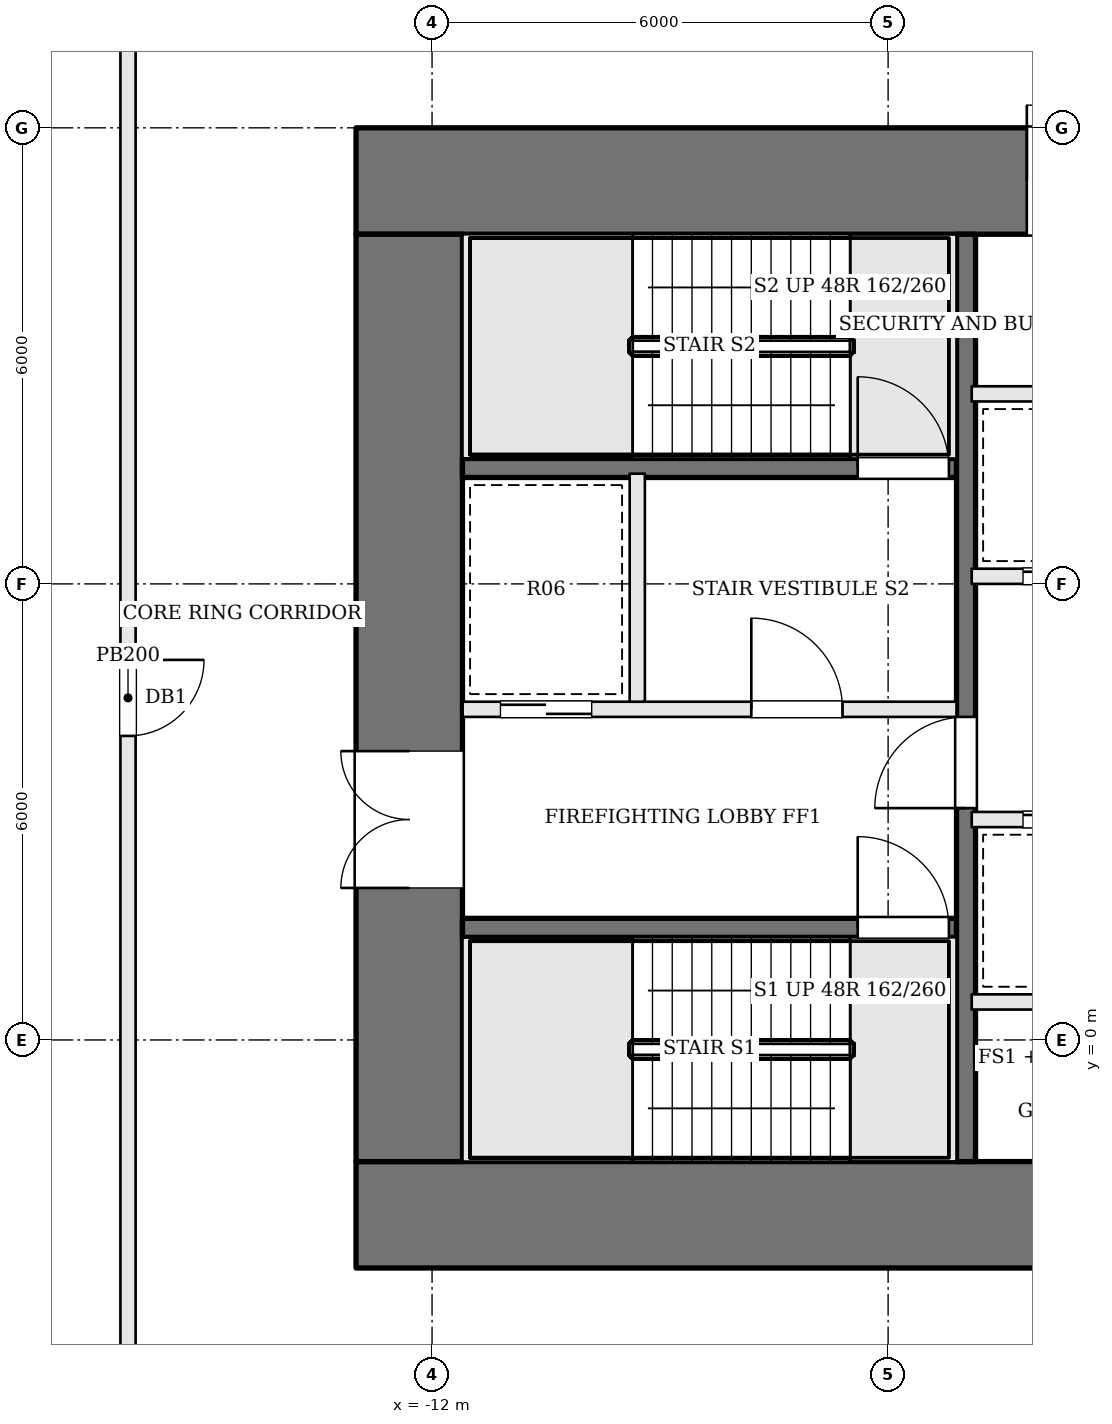
"""IFC4 building model, lengths in metres.
Left out: names, types, materials, properties, quantities, classifications, styles, units other than length and angle.
Written with IfcOpenShell. Run it as: python <this file> out.ifc"""

import sys

from ifc_helpers import new_model, si_unit, direction, frame, frame_2d, origin, place, context, subcontext, project, spatial, rectangle, extrude, element, fill, save


model = new_model("IFC4")
c1 = context("Model", 3, precision=1e-05, world=origin(), true_north=direction((0.0, 1.0)))
c2 = subcontext(c1, "Body", "Model", "MODEL_VIEW")
j1 = project(units=[si_unit("LENGTHUNIT", "METRE"), si_unit("PLANEANGLEUNIT", "RADIAN")], contexts=[c1])
p1 = place(None, origin())
s1 = spatial("IfcSite", under=j1, at=p1, CompositionType="ELEMENT")
p2 = place(p1, origin())
s2 = spatial("IfcBuilding", under=s1, at=p2, CompositionType="ELEMENT")
p3 = place(p2, frame((0.0, 0.0, 15.0)))
s3 = spatial("IfcBuildingStorey", under=s2, at=p3, CompositionType="ELEMENT", Elevation=15.0)
p4 = place(p3, frame((-13.0, 11.3, 0.0), z_axis=(0.0, 0.0, 1.0), x_axis=(1.0, 0.0, 0.0)))
e1 = element("IfcWall", 1, at=p4, inside=s3, PredefinedType="SHEAR", context=c2, shape_type="SweptSolid", body=[
    extrude(rectangle(XDim=26.0, YDim=1.4, at=frame_2d((13.0, 0.0))), origin(), (0.0, 0.0, 1.0), 7.8),
])
p5 = place(p4, frame((8.825, 0.0, 0.0)))
e2 = element("IfcOpeningElement", 2, at=p5, cuts=e1, PredefinedType="OPENING", context=c2, shape_type="SweptSolid", body=[
    extrude(rectangle(XDim=1.0, YDim=2.1, at=frame_2d((0.5, 1.05))), frame((0.0, 0.71, 0.0), z_axis=(0.0, -1.0, 0.0), x_axis=(1.0, 0.0, 0.0)), (0.0, 0.0, 1.0), 1.42),
])
p6 = place(p4, frame((11.425, 0.0, 0.0)))
e3 = element("IfcOpeningElement", 3, at=p6, cuts=e1, PredefinedType="OPENING", context=c2, shape_type="SweptSolid", body=[
    extrude(rectangle(XDim=0.7, YDim=2.1, at=frame_2d((0.35, 1.05))), frame((0.0, 0.71, 0.0), z_axis=(0.0, -1.0, 0.0), x_axis=(1.0, 0.0, 0.0)), (0.0, 0.0, 1.0), 1.42),
])
p7 = place(p4, frame((14.275, 0.0, 0.0)))
e4 = element("IfcOpeningElement", 4, at=p7, cuts=e1, PredefinedType="OPENING", context=c2, shape_type="SweptSolid", body=[
    extrude(rectangle(XDim=0.7, YDim=2.1, at=frame_2d((0.35, 1.05))), frame((0.0, 0.71, 0.0), z_axis=(0.0, -1.0, 0.0), x_axis=(1.0, 0.0, 0.0)), (0.0, 0.0, 1.0), 1.42),
])
p8 = place(p4, frame((16.725, 0.0, 0.0)))
e5 = element("IfcOpeningElement", 5, at=p8, cuts=e1, PredefinedType="OPENING", context=c2, shape_type="SweptSolid", body=[
    extrude(rectangle(XDim=0.7, YDim=2.1, at=frame_2d((0.35, 1.05))), frame((0.0, 0.71, 0.0), z_axis=(0.0, -1.0, 0.0), x_axis=(1.0, 0.0, 0.0)), (0.0, 0.0, 1.0), 1.42),
])
p9 = place(p3, frame((-13.0, -2.3, 0.0), z_axis=(0.0, 0.0, 1.0), x_axis=(1.0, 0.0, 0.0)))
e6 = element("IfcWall", 6, at=p9, inside=s3, PredefinedType="SHEAR", context=c2, shape_type="SweptSolid", body=[
    extrude(rectangle(XDim=26.0, YDim=1.4, at=frame_2d((13.0, 0.0))), origin(), (0.0, 0.0, 1.0), 7.8),
])
p10 = place(p9, frame((9.0, 0.0, 0.0)))
e7 = element("IfcOpeningElement", 7, at=p10, cuts=e6, PredefinedType="OPENING", context=c2, shape_type="SweptSolid", body=[
    extrude(rectangle(XDim=0.9, YDim=2.1, at=frame_2d((0.45, 1.05))), frame((0.0, 0.71, 0.0), z_axis=(0.0, -1.0, 0.0), x_axis=(1.0, 0.0, 0.0)), (0.0, 0.0, 1.0), 1.42),
])
p11 = place(p9, frame((12.225, 0.0, 0.0)))
e8 = element("IfcOpeningElement", 8, at=p11, cuts=e6, PredefinedType="OPENING", context=c2, shape_type="SweptSolid", body=[
    extrude(rectangle(XDim=0.9, YDim=2.1, at=frame_2d((0.45, 1.05))), frame((0.0, 0.71, 0.0), z_axis=(0.0, -1.0, 0.0), x_axis=(1.0, 0.0, 0.0)), (0.0, 0.0, 1.0), 1.42),
])
p12 = place(p9, frame((14.85, 0.0, 0.0)))
e9 = element("IfcOpeningElement", 9, at=p12, cuts=e6, PredefinedType="OPENING", context=c2, shape_type="SweptSolid", body=[
    extrude(rectangle(XDim=0.9, YDim=2.1, at=frame_2d((0.45, 1.05))), frame((0.0, 0.71, 0.0), z_axis=(0.0, -1.0, 0.0), x_axis=(1.0, 0.0, 0.0)), (0.0, 0.0, 1.0), 1.42),
])
p13 = place(p9, frame((16.475, 0.0, 0.0)))
e10 = element("IfcOpeningElement", 10, at=p13, cuts=e6, PredefinedType="OPENING", context=c2, shape_type="SweptSolid", body=[
    extrude(rectangle(XDim=1.0, YDim=2.1, at=frame_2d((0.5, 1.05))), frame((0.0, 0.71, 0.0), z_axis=(0.0, -1.0, 0.0), x_axis=(1.0, 0.0, 0.0)), (0.0, 0.0, 1.0), 1.42),
])
p14 = place(p3, frame((-12.3, -1.6, 0.0), z_axis=(0.0, 0.0, 1.0), x_axis=(0.0, 1.0, 0.0)))
e11 = element("IfcWall", 11, at=p14, inside=s3, PredefinedType="SHEAR", context=c2, shape_type="SweptSolid", body=[
    extrude(rectangle(XDim=12.2, YDim=1.4, at=frame_2d((6.1, 0.0))), origin(), (0.0, 0.0, 1.0), 7.8),
])
p15 = place(p14, frame((3.6, 0.0, 0.0)))
e12 = element("IfcOpeningElement", 12, at=p15, cuts=e11, PredefinedType="OPENING", context=c2, shape_type="SweptSolid", body=[
    extrude(rectangle(XDim=1.8, YDim=2.1, at=frame_2d((0.9, 1.05))), frame((0.0, 0.71, 0.0), z_axis=(0.0, -1.0, 0.0), x_axis=(1.0, 0.0, 0.0)), (0.0, 0.0, 1.0), 1.42),
])
p16 = place(p3, frame((-11.6, 1.475, 0.0), z_axis=(0.0, 0.0, 1.0), x_axis=(1.0, 0.0, 0.0)))
e13 = element("IfcWall", 13, at=p16, inside=s3, PredefinedType="SOLIDWALL", context=c2, shape_type="SweptSolid", body=[
    extrude(rectangle(XDim=6.5, YDim=0.25, at=frame_2d((3.25, 0.0))), origin(), (0.0, 0.0, 1.0), 7.55),
])
p17 = place(p16, frame((5.2, 0.0, 0.0)))
e14 = element("IfcOpeningElement", 14, at=p17, cuts=e13, PredefinedType="OPENING", context=c2, shape_type="SweptSolid", body=[
    extrude(rectangle(XDim=1.2, YDim=2.1, at=frame_2d((0.6, 1.05))), frame((0.0, 0.135, 0.0), z_axis=(0.0, -1.0, 0.0), x_axis=(1.0, 0.0, 0.0)), (0.0, 0.0, 1.0), 0.27),
])
p18 = place(p3, frame((-11.6, 4.35, 0.0), z_axis=(0.0, 0.0, 1.0), x_axis=(1.0, 0.0, 0.0)))
e15 = element("IfcWall", 15, at=p18, inside=s3, PredefinedType="SOLIDWALL", context=c2, shape_type="SweptSolid", body=[
    extrude(rectangle(XDim=6.5, YDim=0.2, at=frame_2d((3.25, 0.0))), origin(), (0.0, 0.0, 1.0), 7.55),
])
p19 = place(p18, frame((3.8, 0.0, 0.0)))
e16 = element("IfcOpeningElement", 16, at=p19, cuts=e15, PredefinedType="OPENING", context=c2, shape_type="SweptSolid", body=[
    extrude(rectangle(XDim=1.2, YDim=2.1, at=frame_2d((0.6, 1.05))), frame((0.0, 0.11, 0.0), z_axis=(0.0, -1.0, 0.0), x_axis=(1.0, 0.0, 0.0)), (0.0, 0.0, 1.0), 0.22),
])
p20 = place(p18, frame((0.5, 0.0, 0.0)))
e17 = element("IfcOpeningElement", 17, at=p20, cuts=e15, PredefinedType="OPENING", context=c2, shape_type="SweptSolid", body=[
    extrude(rectangle(XDim=1.2, YDim=2.1, at=frame_2d((0.6, 1.05))), frame((0.0, 0.11, 0.0), z_axis=(0.0, -1.0, 0.0), x_axis=(1.0, 0.0, 0.0)), (0.0, 0.0, 1.0), 0.22),
])
p21 = place(p3, frame((-11.6, 7.525, 0.0), z_axis=(0.0, 0.0, 1.0), x_axis=(1.0, 0.0, 0.0)))
e18 = element("IfcWall", 18, at=p21, inside=s3, PredefinedType="SOLIDWALL", context=c2, shape_type="SweptSolid", body=[
    extrude(rectangle(XDim=6.5, YDim=0.25, at=frame_2d((3.25, 0.0))), origin(), (0.0, 0.0, 1.0), 7.55),
])
p22 = place(p21, frame((5.2, 0.0, 0.0)))
e19 = element("IfcOpeningElement", 19, at=p22, cuts=e18, PredefinedType="OPENING", context=c2, shape_type="SweptSolid", body=[
    extrude(rectangle(XDim=1.2, YDim=2.1, at=frame_2d((0.6, 1.05))), frame((0.0, 0.135, 0.0), z_axis=(0.0, -1.0, 0.0), x_axis=(1.0, 0.0, 0.0)), (0.0, 0.0, 1.0), 0.27),
])
p23 = place(p3, frame((-9.3, 4.45, 0.0), z_axis=(0.0, 0.0, 1.0), x_axis=(0.0, 1.0, 0.0)))
e20 = element("IfcWall", 20, at=p23, inside=s3, PredefinedType="SOLIDWALL", context=c2, shape_type="SweptSolid", body=[
    extrude(rectangle(XDim=3.0, YDim=0.2, at=frame_2d((1.5, 0.0))), origin(), (0.0, 0.0, 1.0), 7.55),
])
p24 = place(p3, frame((-4.975, -1.6, 0.0), z_axis=(0.0, 0.0, 1.0), x_axis=(0.0, 1.0, 0.0)))
e21 = element("IfcWall", 21, at=p24, inside=s3, PredefinedType="SOLIDWALL", context=c2, shape_type="SweptSolid", body=[
    extrude(rectangle(XDim=12.2, YDim=0.25, at=frame_2d((6.1, 0.0))), origin(), (0.0, 0.0, 1.0), 7.55),
])
p25 = place(p24, frame((4.65, 0.0, 0.0)))
e22 = element("IfcOpeningElement", 22, at=p25, cuts=e21, PredefinedType="OPENING", context=c2, shape_type="SweptSolid", body=[
    extrude(rectangle(XDim=1.2, YDim=2.1, at=frame_2d((0.6, 1.05))), frame((0.0, 0.135, 0.0), z_axis=(0.0, -1.0, 0.0), x_axis=(1.0, 0.0, 0.0)), (0.0, 0.0, 1.0), 0.27),
])
p26 = place(p3, frame((-4.9, 0.5, 0.0), z_axis=(0.0, 0.0, 1.0), x_axis=(1.0, 0.0, 0.0)))
e23 = element("IfcWall", 23, at=p26, inside=s3, PredefinedType="SOLIDWALL", context=c2, shape_type="SweptSolid", body=[
    extrude(rectangle(XDim=9.8, YDim=0.2, at=frame_2d((4.9, 0.0))), origin(), (0.0, 0.0, 1.0), 7.55),
])
p27 = place(p3, frame((-4.9, 2.9, 0.0), z_axis=(0.0, 0.0, 1.0), x_axis=(1.0, 0.0, 0.0)))
e24 = element("IfcWall", 24, at=p27, inside=s3, PredefinedType="SOLIDWALL", context=c2, shape_type="SweptSolid", body=[
    extrude(rectangle(XDim=9.8, YDim=0.2, at=frame_2d((4.9, 0.0))), origin(), (0.0, 0.0, 1.0), 7.55),
])
p28 = place(p27, frame((0.675, 0.0, 0.0)))
e25 = element("IfcOpeningElement", 25, at=p28, cuts=e24, PredefinedType="OPENING", context=c2, shape_type="SweptSolid", body=[
    extrude(rectangle(XDim=1.1, YDim=2.1, at=frame_2d((0.55, 1.05))), frame((0.0, 0.11, 0.0), z_axis=(0.0, -1.0, 0.0), x_axis=(1.0, 0.0, 0.0)), (0.0, 0.0, 1.0), 0.22),
])
p29 = place(p27, frame((3.125, 0.0, 0.0)))
e26 = element("IfcOpeningElement", 26, at=p29, cuts=e24, PredefinedType="OPENING", context=c2, shape_type="SweptSolid", body=[
    extrude(rectangle(XDim=1.1, YDim=2.1, at=frame_2d((0.55, 1.05))), frame((0.0, 0.11, 0.0), z_axis=(0.0, -1.0, 0.0), x_axis=(1.0, 0.0, 0.0)), (0.0, 0.0, 1.0), 0.22),
])
p30 = place(p3, frame((-4.9, 6.1, 0.0), z_axis=(0.0, 0.0, 1.0), x_axis=(1.0, 0.0, 0.0)))
e27 = element("IfcWall", 27, at=p30, inside=s3, PredefinedType="SOLIDWALL", context=c2, shape_type="SweptSolid", body=[
    extrude(rectangle(XDim=9.8, YDim=0.2, at=frame_2d((4.9, 0.0))), origin(), (0.0, 0.0, 1.0), 7.55),
])
p31 = place(p30, frame((0.675, 0.0, 0.0)))
e28 = element("IfcOpeningElement", 28, at=p31, cuts=e27, PredefinedType="OPENING", context=c2, shape_type="SweptSolid", body=[
    extrude(rectangle(XDim=1.1, YDim=2.1, at=frame_2d((0.55, 1.05))), frame((0.0, 0.11, 0.0), z_axis=(0.0, -1.0, 0.0), x_axis=(1.0, 0.0, 0.0)), (0.0, 0.0, 1.0), 0.22),
])
p32 = place(p30, frame((3.125, 0.0, 0.0)))
e29 = element("IfcOpeningElement", 29, at=p32, cuts=e27, PredefinedType="OPENING", context=c2, shape_type="SweptSolid", body=[
    extrude(rectangle(XDim=1.1, YDim=2.1, at=frame_2d((0.55, 1.05))), frame((0.0, 0.11, 0.0), z_axis=(0.0, -1.0, 0.0), x_axis=(1.0, 0.0, 0.0)), (0.0, 0.0, 1.0), 0.22),
])
p33 = place(p30, frame((5.575, 0.0, 0.0)))
e30 = element("IfcOpeningElement", 30, at=p33, cuts=e27, PredefinedType="OPENING", context=c2, shape_type="SweptSolid", body=[
    extrude(rectangle(XDim=1.1, YDim=2.1, at=frame_2d((0.55, 1.05))), frame((0.0, 0.11, 0.0), z_axis=(0.0, -1.0, 0.0), x_axis=(1.0, 0.0, 0.0)), (0.0, 0.0, 1.0), 0.22),
])
p34 = place(p30, frame((8.025, 0.0, 0.0)))
e31 = element("IfcOpeningElement", 31, at=p34, cuts=e27, PredefinedType="OPENING", context=c2, shape_type="SweptSolid", body=[
    extrude(rectangle(XDim=1.1, YDim=2.1, at=frame_2d((0.55, 1.05))), frame((0.0, 0.11, 0.0), z_axis=(0.0, -1.0, 0.0), x_axis=(1.0, 0.0, 0.0)), (0.0, 0.0, 1.0), 0.22),
])
p35 = place(p3, frame((-4.9, 8.5, 0.0), z_axis=(0.0, 0.0, 1.0), x_axis=(1.0, 0.0, 0.0)))
e32 = element("IfcWall", 32, at=p35, inside=s3, PredefinedType="SOLIDWALL", context=c2, shape_type="SweptSolid", body=[
    extrude(rectangle(XDim=9.8, YDim=0.2, at=frame_2d((4.9, 0.0))), origin(), (0.0, 0.0, 1.0), 7.55),
])
p36 = place(p3, frame((-16.0, 14.9, 0.0), z_axis=(0.0, 0.0, 1.0), x_axis=(0.0, -1.0, 0.0)))
e33 = element("IfcWall", 33, at=p36, inside=s3, PredefinedType="PARTITIONING", context=c2, shape_type="SweptSolid", body=[
    extrude(rectangle(XDim=20.8, YDim=0.2, at=frame_2d((10.4, 0.0))), origin(), (0.0, 0.0, 1.0), 6.83),
])
p37 = place(p36, frame((9.9, 0.0, 0.0)))
e34 = element("IfcOpeningElement", 34, at=p37, cuts=e33, PredefinedType="OPENING", context=c2, shape_type="SweptSolid", body=[
    extrude(rectangle(XDim=1.0, YDim=2.1, at=frame_2d((0.5, 1.05))), frame((0.0, 0.11, 0.0), z_axis=(0.0, -1.0, 0.0), x_axis=(1.0, 0.0, 0.0)), (0.0, 0.0, 1.0), 0.22),
])
p38 = place(p15, origin())
e35 = element("IfcDoor", 35, at=p38, inside=s3, OperationType="DOUBLE_DOOR_SINGLE_SWING", PredefinedType="DOOR", context=c2, shape_type="SweptSolid", body=[
    extrude(rectangle(XDim=1.8, YDim=2.1, at=frame_2d((0.9, 1.05))), frame((0.0, 0.025, 0.0), z_axis=(0.0, -1.0, 0.0), x_axis=(1.0, 0.0, 0.0)), (0.0, 0.0, 1.0), 0.05),
])
fill(e12, e35)
p39 = place(p25, origin())
e36 = element("IfcDoor", 36, at=p39, inside=s3, OperationType="SINGLE_SWING_LEFT", PredefinedType="DOOR", context=c2, shape_type="SweptSolid", body=[
    extrude(rectangle(XDim=1.2, YDim=2.1, at=frame_2d((0.6, 1.05))), frame((0.0, 0.025, 0.0), z_axis=(0.0, -1.0, 0.0), x_axis=(1.0, 0.0, 0.0)), (0.0, 0.0, 1.0), 0.05),
])
fill(e22, e36)
p40 = place(p19, origin())
e37 = element("IfcDoor", 37, at=p40, inside=s3, OperationType="SINGLE_SWING_LEFT", PredefinedType="DOOR", context=c2, shape_type="SweptSolid", body=[
    extrude(rectangle(XDim=1.2, YDim=2.1, at=frame_2d((0.6, 1.05))), frame((0.0, 0.025, 0.0), z_axis=(0.0, -1.0, 0.0), x_axis=(1.0, 0.0, 0.0)), (0.0, 0.0, 1.0), 0.05),
])
fill(e16, e37)
p41 = place(p17, origin())
e38 = element("IfcDoor", 38, at=p41, inside=s3, OperationType="SINGLE_SWING_LEFT", PredefinedType="DOOR", context=c2, shape_type="SweptSolid", body=[
    extrude(rectangle(XDim=1.2, YDim=2.1, at=frame_2d((0.6, 1.05))), frame((0.0, 0.025, 0.0), z_axis=(0.0, -1.0, 0.0), x_axis=(1.0, 0.0, 0.0)), (0.0, 0.0, 1.0), 0.05),
])
fill(e14, e38)
p42 = place(p22, origin())
e39 = element("IfcDoor", 39, at=p42, inside=s3, OperationType="SINGLE_SWING_LEFT", PredefinedType="DOOR", context=c2, shape_type="SweptSolid", body=[
    extrude(rectangle(XDim=1.2, YDim=2.1, at=frame_2d((0.6, 1.05))), frame((0.0, 0.025, 0.0), z_axis=(0.0, -1.0, 0.0), x_axis=(1.0, 0.0, 0.0)), (0.0, 0.0, 1.0), 0.05),
])
fill(e19, e39)
p43 = place(p20, origin())
e40 = element("IfcDoor", 40, at=p43, inside=s3, OperationType="SLIDING_TO_RIGHT", PredefinedType="DOOR", context=c2, shape_type="SweptSolid", body=[
    extrude(rectangle(XDim=1.2, YDim=2.1, at=frame_2d((0.6, 1.05))), frame((0.0, 0.025, 0.0), z_axis=(0.0, -1.0, 0.0), x_axis=(1.0, 0.0, 0.0)), (0.0, 0.0, 1.0), 0.05),
])
fill(e17, e40)
p44 = place(p28, origin())
e41 = element("IfcDoor", 41, at=p44, inside=s3, OperationType="SLIDING_TO_RIGHT", PredefinedType="DOOR", context=c2, shape_type="SweptSolid", body=[
    extrude(rectangle(XDim=1.1, YDim=2.1, at=frame_2d((0.55, 1.05))), frame((0.0, 0.025, 0.0), z_axis=(0.0, -1.0, 0.0), x_axis=(1.0, 0.0, 0.0)), (0.0, 0.0, 1.0), 0.05),
])
fill(e25, e41)
p45 = place(p31, origin())
e42 = element("IfcDoor", 42, at=p45, inside=s3, OperationType="SLIDING_TO_RIGHT", PredefinedType="DOOR", context=c2, shape_type="SweptSolid", body=[
    extrude(rectangle(XDim=1.1, YDim=2.1, at=frame_2d((0.55, 1.05))), frame((0.0, 0.025, 0.0), z_axis=(0.0, -1.0, 0.0), x_axis=(1.0, 0.0, 0.0)), (0.0, 0.0, 1.0), 0.05),
])
fill(e28, e42)
p46 = place(p5, origin())
e43 = element("IfcDoor", 43, at=p46, inside=s3, OperationType="SINGLE_SWING_LEFT", PredefinedType="DOOR", context=c2, shape_type="SweptSolid", body=[
    extrude(rectangle(XDim=1.0, YDim=2.1, at=frame_2d((0.5, 1.05))), frame((0.0, 0.025, 0.0), z_axis=(0.0, -1.0, 0.0), x_axis=(1.0, 0.0, 0.0)), (0.0, 0.0, 1.0), 0.05),
])
fill(e2, e43)
p47 = place(p37, origin())
e44 = element("IfcDoor", 44, at=p47, inside=s3, OperationType="SINGLE_SWING_LEFT", PredefinedType="DOOR", context=c2, shape_type="SweptSolid", body=[
    extrude(rectangle(XDim=1.0, YDim=2.1, at=frame_2d((0.5, 1.05))), frame((0.0, 0.025, 0.0), z_axis=(0.0, -1.0, 0.0), x_axis=(1.0, 0.0, 0.0)), (0.0, 0.0, 1.0), 0.05),
])
fill(e34, e44)
save(model, sys.argv[1])
